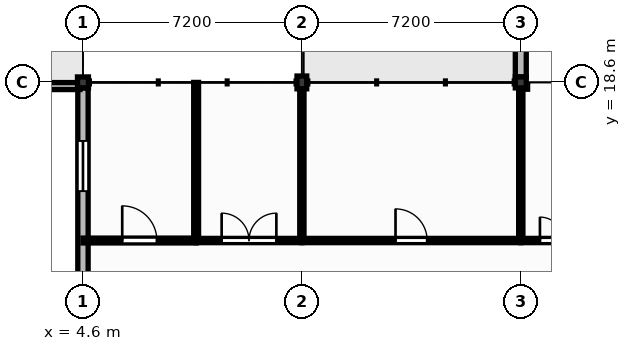
"""IFC4 building model, lengths in metres.
Left out: names, types, materials, properties, quantities, classifications, styles, units other than length and angle.
Written with IfcOpenShell. Run it as: python <this file> out.ifc"""

import sys

from ifc_helpers import new_model, si_unit, direction, frame, frame_2d, origin, origin_2d, place, context, subcontext, project, spatial, rectangle, extrude, element, fill, save


model = new_model("IFC4")
c1 = context("Model", 3, precision=1e-05, world=origin(), true_north=direction((0.0, 1.0)))
c2 = subcontext(c1, "Body", "Model", "MODEL_VIEW")
j1 = project(units=[si_unit("LENGTHUNIT", "METRE"), si_unit("PLANEANGLEUNIT", "RADIAN")], contexts=[c1])
p1 = place(None, origin())
s1 = spatial("IfcSite", under=j1, at=p1, CompositionType="ELEMENT")
p2 = place(p1, origin())
s2 = spatial("IfcBuilding", under=s1, at=p2, CompositionType="ELEMENT")
p3 = place(p2, frame((0.0, 0.0, 4.5)))
s3 = spatial("IfcBuildingStorey", under=s2, at=p3, CompositionType="ELEMENT", Elevation=4.5)
p4 = place(p3, frame((4.6, 18.6, 0.0), z_axis=(0.0, 0.0, 1.0), x_axis=(1.0, 0.0, 0.0)))
e1 = element("IfcColumn", 1, at=p4, inside=s3, PredefinedType="COLUMN", context=c2, shape_type="SweptSolid", body=[
    extrude(rectangle(XDim=0.36, YDim=0.36, at=origin_2d()), origin(), (0.0, 0.0, 1.0), 4.26),
])
p5 = place(p3, frame((11.8, 18.6, 0.0), z_axis=(0.0, 0.0, 1.0), x_axis=(1.0, 0.0, 0.0)))
e2 = element("IfcColumn", 2, at=p5, inside=s3, PredefinedType="COLUMN", context=c2, shape_type="SweptSolid", body=[
    extrude(rectangle(XDim=0.32, YDim=0.42, at=origin_2d()), origin(), (0.0, 0.0, 1.0), 4.26),
])
p6 = place(p3, frame((19.0, 18.6, 0.0), z_axis=(0.0, 0.0, 1.0), x_axis=(1.0, 0.0, 0.0)))
e3 = element("IfcColumn", 3, at=p6, inside=s3, PredefinedType="COLUMN", context=c2, shape_type="SweptSolid", body=[
    extrude(rectangle(XDim=0.36, YDim=0.36, at=origin_2d()), origin(), (0.0, 0.0, 1.0), 4.26),
])
p7 = place(p3, frame((4.6, 11.61, 0.0), z_axis=(0.0, 0.0, 1.0), x_axis=(0.0, 1.0, 0.0)))
e4 = element("IfcWall", 4, at=p7, inside=s3, PredefinedType="SOLIDWALL", context=c2, shape_type="SweptSolid", body=[
    extrude(rectangle(XDim=6.81, YDim=0.34, at=frame_2d((3.405, 0.0))), origin(), (0.0, 0.0, 1.0), 3.8),
])
p8 = place(p7, frame((3.415, 0.0, 1.35)))
e5 = element("IfcOpeningElement", 5, at=p8, cuts=e4, PredefinedType="OPENING", context=c2, shape_type="SweptSolid", body=[
    extrude(rectangle(XDim=1.65, YDim=1.4, at=frame_2d((0.825, 0.7))), frame((0.0, 0.18, 0.0), z_axis=(0.0, -1.0, 0.0), x_axis=(1.0, 0.0, 0.0)), (0.0, 0.0, 1.0), 0.36),
])
p9 = place(p3, frame((19.0, 18.78, 0.0), z_axis=(0.0, 0.0, 1.0), x_axis=(0.0, 1.0, 0.0)))
e6 = element("IfcWall", 6, at=p9, inside=s3, PredefinedType="SOLIDWALL", context=c2, shape_type="SweptSolid", body=[
    extrude(rectangle(XDim=8.24, YDim=0.36, at=frame_2d((4.12, 0.0))), origin(), (0.0, 0.0, 1.0), 3.8),
])
p10 = place(p9, frame((3.37, 0.0, 0.0)))
e7 = element("IfcOpeningElement", 7, at=p10, cuts=e6, PredefinedType="OPENING", context=c2, shape_type="SweptSolid", body=[
    extrude(rectangle(XDim=1.5, YDim=2.3, at=frame_2d((0.75, 1.15))), frame((0.0, 0.19, 0.0), z_axis=(0.0, -1.0, 0.0), x_axis=(1.0, 0.0, 0.0)), (0.0, 0.0, 1.0), 0.38),
])
p11 = place(p9, frame((0.975, 0.0, 1.0)))
e8 = element("IfcOpeningElement", 8, at=p11, cuts=e6, PredefinedType="OPENING", context=c2, shape_type="SweptSolid", body=[
    extrude(rectangle(XDim=1.48, YDim=2.2, at=frame_2d((0.74, 1.1))), frame((0.0, 0.19, 0.0), z_axis=(0.0, -1.0, 0.0), x_axis=(1.0, 0.0, 0.0)), (0.0, 0.0, 1.0), 0.38),
])
p12 = place(p9, frame((5.725, 0.0, 1.0)))
e9 = element("IfcOpeningElement", 9, at=p12, cuts=e6, PredefinedType="OPENING", context=c2, shape_type="SweptSolid", body=[
    extrude(rectangle(XDim=1.6, YDim=2.2, at=frame_2d((0.8, 1.1))), frame((0.0, 0.19, 0.0), z_axis=(0.0, -1.0, 0.0), x_axis=(1.0, 0.0, 0.0)), (0.0, 0.0, 1.0), 0.38),
])
p13 = place(p3, frame((2.78, 18.48, -0.05), z_axis=(0.0, 0.0, 1.0), x_axis=(1.0, 0.0, 0.0)))
e10 = element("IfcWall", 10, at=p13, inside=s3, PredefinedType="PARAPET", context=c2, shape_type="SweptSolid", body=[
    extrude(rectangle(XDim=1.72, YDim=0.23, at=frame_2d((0.86, 0.0))), origin(), (0.0, 0.0, 1.0), 0.7),
])
p14 = place(p3, frame((4.6, 13.4, 0.0), z_axis=(0.0, 0.0, 1.0), x_axis=(1.0, 0.0, 0.0)))
e11 = element("IfcWall", 11, at=p14, inside=s3, PredefinedType="PARTITIONING", context=c2, shape_type="SweptSolid", body=[
    extrude(rectangle(XDim=3.722, YDim=0.16, at=frame_2d((1.861, 0.0))), origin(), (0.0, 0.0, 1.0), 4.18),
])
p15 = place(p14, frame((1.291, 0.0, 0.0)))
e12 = element("IfcOpeningElement", 12, at=p15, cuts=e11, PredefinedType="OPENING", context=c2, shape_type="SweptSolid", body=[
    extrude(rectangle(XDim=1.14, YDim=2.15, at=frame_2d((0.57, 1.075))), frame((0.0, 0.09, 0.0), z_axis=(0.0, -1.0, 0.0), x_axis=(1.0, 0.0, 0.0)), (0.0, 0.0, 1.0), 0.18),
])
p16 = place(p3, frame((8.322, 13.47, 0.0), z_axis=(0.0, 0.0, 1.0), x_axis=(0.0, 1.0, 0.0)))
e13 = element("IfcWall", 13, at=p16, inside=s3, PredefinedType="PARTITIONING", context=c2, shape_type="SweptSolid", body=[
    extrude(rectangle(XDim=5.13, YDim=0.16, at=frame_2d((2.565, 0.0))), origin(), (0.0, 0.0, 1.0), 4.18),
])
p17 = place(p3, frame((8.322, 13.4, 0.0), z_axis=(0.0, 0.0, 1.0), x_axis=(1.0, 0.0, 0.0)))
e14 = element("IfcWall", 14, at=p17, inside=s3, PredefinedType="PARTITIONING", context=c2, shape_type="SweptSolid", body=[
    extrude(rectangle(XDim=3.478, YDim=0.14, at=frame_2d((1.739, 0.0))), origin(), (0.0, 0.0, 1.0), 4.18),
])
p18 = place(p17, frame((0.839, 0.0, 0.0)))
e15 = element("IfcOpeningElement", 15, at=p18, cuts=e14, PredefinedType="OPENING", context=c2, shape_type="SweptSolid", body=[
    extrude(rectangle(XDim=1.8, YDim=2.3, at=frame_2d((0.9, 1.15))), frame((0.0, 0.08, 0.0), z_axis=(0.0, -1.0, 0.0), x_axis=(1.0, 0.0, 0.0)), (0.0, 0.0, 1.0), 0.16),
])
p19 = place(p3, frame((11.8, 13.47, 0.0), z_axis=(0.0, 0.0, 1.0), x_axis=(0.0, 1.0, 0.0)))
e16 = element("IfcWall", 16, at=p19, inside=s3, PredefinedType="PARTITIONING", context=c2, shape_type="SweptSolid", body=[
    extrude(rectangle(XDim=4.92, YDim=0.14, at=frame_2d((2.46, 0.0))), origin(), (0.0, 0.0, 1.0), 3.74),
])
p20 = place(p3, frame((11.8, 13.4, 0.0), z_axis=(0.0, 0.0, 1.0), x_axis=(1.0, 0.0, 0.0)))
e17 = element("IfcWall", 17, at=p20, inside=s3, PredefinedType="PARTITIONING", context=c2, shape_type="SweptSolid", body=[
    extrude(rectangle(XDim=7.2, YDim=0.14, at=frame_2d((3.6, 0.0))), origin(), (0.0, 0.0, 1.0), 4.18),
])
p21 = place(p20, frame((3.08, 0.0, 0.0)))
e18 = element("IfcOpeningElement", 18, at=p21, cuts=e17, PredefinedType="OPENING", context=c2, shape_type="SweptSolid", body=[
    extrude(rectangle(XDim=1.04, YDim=2.1, at=frame_2d((0.52, 1.05))), frame((0.0, 0.08, 0.0), z_axis=(0.0, -1.0, 0.0), x_axis=(1.0, 0.0, 0.0)), (0.0, 0.0, 1.0), 0.16),
])
p22 = place(p3, frame((19.0, 13.47, 0.0), z_axis=(0.0, 0.0, 1.0), x_axis=(0.0, 1.0, 0.0)))
e19 = element("IfcWall", 19, at=p22, inside=s3, PredefinedType="PARTITIONING", context=c2, shape_type="SweptSolid", body=[
    extrude(rectangle(XDim=4.95, YDim=0.14, at=frame_2d((2.475, 0.0))), origin(), (0.0, 0.0, 1.0), 3.74),
])
p23 = place(p3, frame((19.0, 13.4, 0.0), z_axis=(0.0, 0.0, 1.0), x_axis=(1.0, 0.0, 0.0)))
e20 = element("IfcWall", 20, at=p23, inside=s3, PredefinedType="PARTITIONING", context=c2, shape_type="SweptSolid", body=[
    extrude(rectangle(XDim=2.8, YDim=0.14, at=frame_2d((1.4, 0.0))), origin(), (0.0, 0.0, 1.0), 4.18),
])
p24 = place(p23, frame((0.63, 0.0, 0.0)))
e21 = element("IfcOpeningElement", 21, at=p24, cuts=e20, PredefinedType="OPENING", context=c2, shape_type="SweptSolid", body=[
    extrude(rectangle(XDim=1.54, YDim=2.25, at=frame_2d((0.77, 1.125))), frame((0.0, 0.08, 0.0), z_axis=(0.0, -1.0, 0.0), x_axis=(1.0, 0.0, 0.0)), (0.0, 0.0, 1.0), 0.16),
])
p25 = place(p8, origin())
e22 = element("IfcWindow", 22, at=p25, inside=s3, PartitioningType="DOUBLE_PANEL_VERTICAL", PredefinedType="WINDOW", context=c2, shape_type="SweptSolid", body=[
    extrude(rectangle(XDim=1.65, YDim=1.4, at=frame_2d((0.825, 0.7))), frame((0.0, 0.03, 0.0), z_axis=(0.0, -1.0, 0.0), x_axis=(1.0, 0.0, 0.0)), (0.0, 0.0, 1.0), 0.06),
])
fill(e5, e22)
p26 = place(p24, origin())
e23 = element("IfcDoor", 23, at=p26, inside=s3, OperationType="DOUBLE_DOOR_SINGLE_SWING", PredefinedType="DOOR", context=c2, shape_type="SweptSolid", body=[
    extrude(rectangle(XDim=1.54, YDim=2.25, at=frame_2d((0.77, 1.125))), frame((0.0, 0.025, 0.0), z_axis=(0.0, -1.0, 0.0), x_axis=(1.0, 0.0, 0.0)), (0.0, 0.0, 1.0), 0.05),
])
fill(e21, e23)
p27 = place(p15, origin())
e24 = element("IfcDoor", 24, at=p27, inside=s3, OperationType="SINGLE_SWING_LEFT", PredefinedType="DOOR", context=c2, shape_type="SweptSolid", body=[
    extrude(rectangle(XDim=1.14, YDim=2.15, at=frame_2d((0.57, 1.075))), frame((0.0, 0.025, 0.0), z_axis=(0.0, -1.0, 0.0), x_axis=(1.0, 0.0, 0.0)), (0.0, 0.0, 1.0), 0.05),
])
fill(e12, e24)
p28 = place(p18, origin())
e25 = element("IfcDoor", 25, at=p28, inside=s3, OperationType="DOUBLE_DOOR_SINGLE_SWING", PredefinedType="DOOR", context=c2, shape_type="SweptSolid", body=[
    extrude(rectangle(XDim=1.8, YDim=2.3, at=frame_2d((0.9, 1.15))), frame((0.0, 0.025, 0.0), z_axis=(0.0, -1.0, 0.0), x_axis=(1.0, 0.0, 0.0)), (0.0, 0.0, 1.0), 0.05),
])
fill(e15, e25)
p29 = place(p21, origin())
e26 = element("IfcDoor", 26, at=p29, inside=s3, OperationType="SINGLE_SWING_LEFT", PredefinedType="DOOR", context=c2, shape_type="SweptSolid", body=[
    extrude(rectangle(XDim=1.04, YDim=2.1, at=frame_2d((0.52, 1.05))), frame((0.0, 0.025, 0.0), z_axis=(0.0, -1.0, 0.0), x_axis=(1.0, 0.0, 0.0)), (0.0, 0.0, 1.0), 0.05),
])
fill(e18, e26)
save(model, sys.argv[1])
